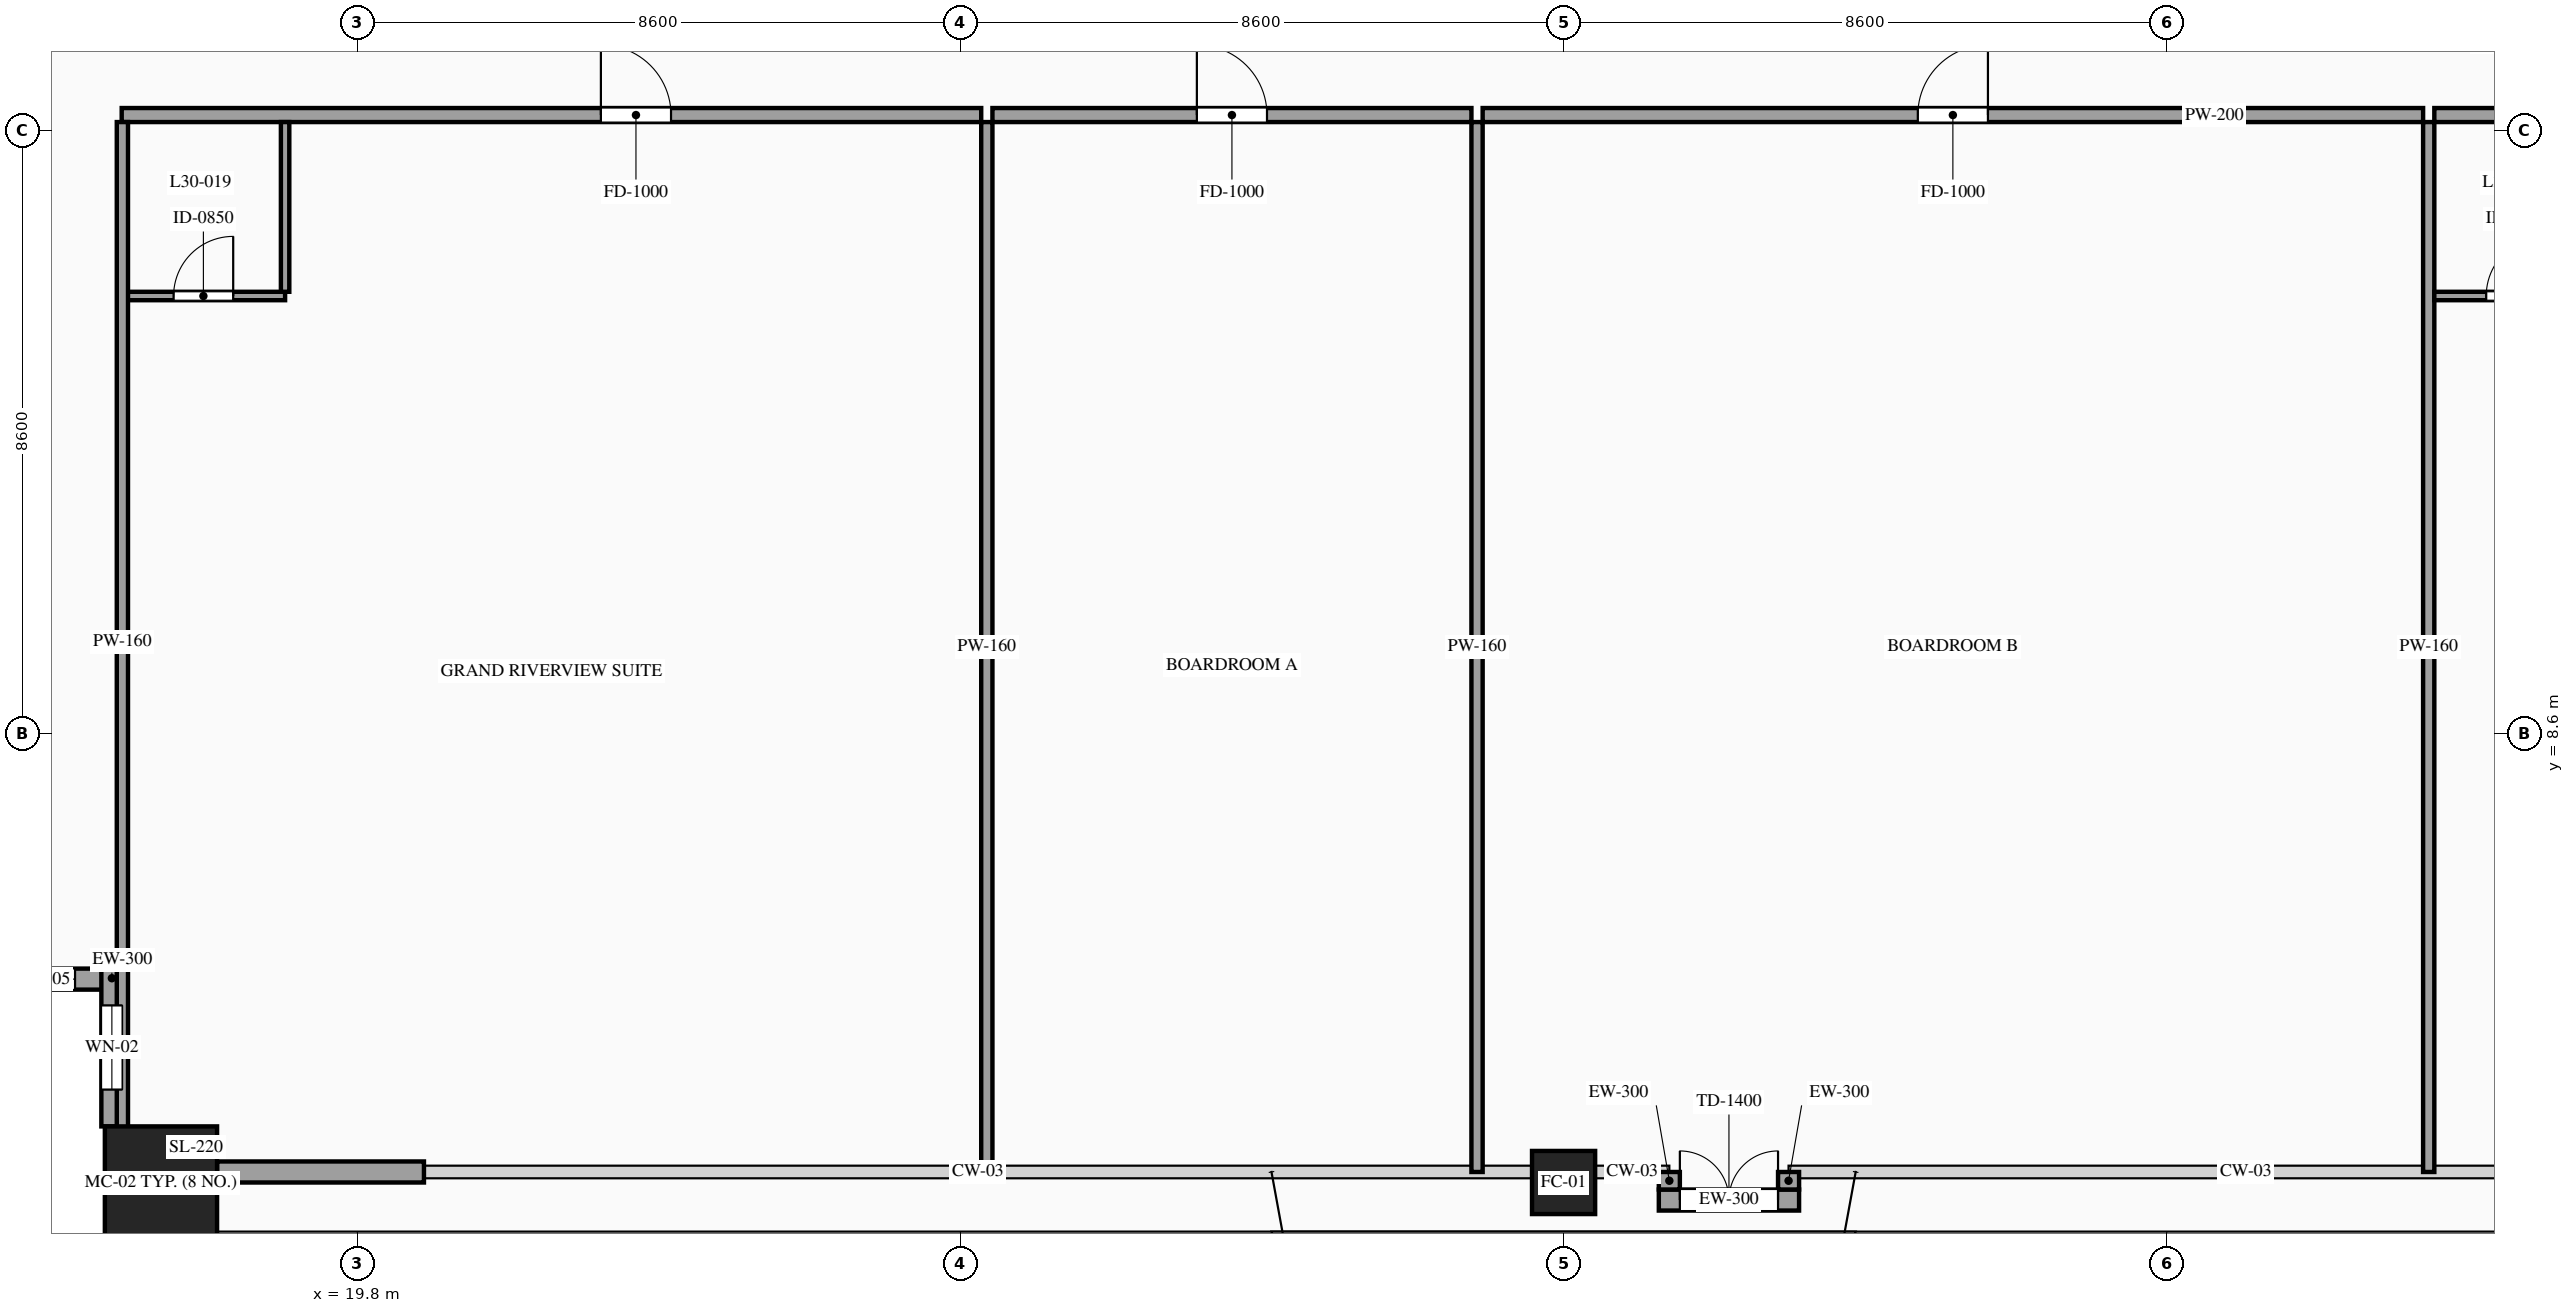
"""IFC4 building model, lengths in metres.
Left out: names, types, materials, properties, quantities, classifications, styles, units other than length and angle.
Written with IfcOpenShell. Run it as: python <this file> out.ifc"""

import sys

from ifc_helpers import new_model, si_unit, direction, frame, frame_2d, origin, origin_2d, place, context, subcontext, project, spatial, rectangle, hollow_rectangle, extrude, source, transform, mapped, element, fill, save


model = new_model("IFC4")
c1 = context("Model", 3, precision=1e-05, world=origin(), true_north=direction((0.0, 1.0)))
c2 = subcontext(c1, "Body", "Model", "MODEL_VIEW")
j1 = project(units=[si_unit("LENGTHUNIT", "METRE"), si_unit("PLANEANGLEUNIT", "RADIAN")], contexts=[c1])
p1 = place(None, origin())
s1 = spatial("IfcSite", under=j1, at=p1, CompositionType="ELEMENT")
p2 = place(p1, origin())
s2 = spatial("IfcBuilding", under=s1, at=p2, CompositionType="ELEMENT")
p3 = place(p2, frame((0.0, 0.0, 115.4)))
s3 = spatial("IfcBuildingStorey", under=s2, at=p3, CompositionType="ELEMENT", Elevation=115.4)
m1 = source(origin(), c2, "Body", "SweptSolid", [
    extrude(hollow_rectangle(XDim=1.6, YDim=1.6, WallThickness=0.07, at=origin_2d()), origin(), (0.0, 0.0, 1.0), 3.6),
])
p4 = place(p3, frame((17.0, 2.2, 0.0), z_axis=(0.0, 0.0, 1.0), x_axis=(1.0, 0.0, 0.0)))
e1 = element("IfcColumn", 1, at=p4, inside=s3, PredefinedType="COLUMN", context=c2, shape_type="MappedRepresentation", body=[
    mapped(m1, transform((0.0, 0.0, 0.0), scale=1.0)),
])
m2 = source(origin(), c2, "Body", "SweptSolid", [
    extrude(hollow_rectangle(XDim=0.9, YDim=0.9, WallThickness=0.042, at=origin_2d()), origin(), (0.0, 0.0, 1.0), 3.6),
])
p5 = place(p3, frame((37.0, 2.2, 0.0), z_axis=(0.0, 0.0, 1.0), x_axis=(1.0, 0.0, 0.0)))
e2 = element("IfcColumn", 2, at=p5, inside=s3, PredefinedType="COLUMN", context=c2, shape_type="MappedRepresentation", body=[
    mapped(m2, transform((0.0, 0.0, 0.0), scale=1.0)),
])
p6 = place(p3, frame((14.2, 5.1, 0.0), z_axis=(0.0, 0.0, 1.0), x_axis=(1.0, 0.0, 0.0)))
e3 = element("IfcWall", 3, at=p6, inside=s3, PredefinedType="SOLIDWALL", context=c2, shape_type="SweptSolid", body=[
    extrude(rectangle(XDim=2.25, YDim=0.3, at=frame_2d((1.125, 0.0))), origin(), (0.0, 0.0, 1.0), 3.38),
])
p7 = place(p6, frame((0.675, 0.0, 0.85)))
e4 = element("IfcOpeningElement", 4, at=p7, cuts=e3, PredefinedType="OPENING", context=c2, shape_type="SweptSolid", body=[
    extrude(rectangle(XDim=0.9, YDim=1.5, at=frame_2d((0.45, 0.75))), frame((0.0, 0.165, 0.0), z_axis=(0.0, -1.0, 0.0), x_axis=(1.0, 0.0, 0.0)), (0.0, 0.0, 1.0), 0.33),
])
p8 = place(p3, frame((16.3, 5.25, 0.0), z_axis=(0.0, 0.0, 1.0), x_axis=(0.0, -1.0, 0.0)))
e5 = element("IfcWall", 5, at=p8, inside=s3, PredefinedType="SOLIDWALL", context=c2, shape_type="SweptSolid", body=[
    extrude(rectangle(XDim=2.25, YDim=0.3, at=frame_2d((1.125, 0.0))), origin(), (0.0, 0.0, 1.0), 3.38),
])
p9 = place(p8, frame((0.525, 0.0, 0.85)))
e6 = element("IfcOpeningElement", 6, at=p9, cuts=e5, PredefinedType="OPENING", context=c2, shape_type="SweptSolid", body=[
    extrude(rectangle(XDim=1.2, YDim=2.1, at=frame_2d((0.6, 1.05))), frame((0.0, 0.165, 0.0), z_axis=(0.0, -1.0, 0.0), x_axis=(1.0, 0.0, 0.0)), (0.0, 0.0, 1.0), 0.33),
])
m3 = source(origin(), c2, "Body", "SweptSolid", [
    extrude(rectangle(XDim=2.95, YDim=0.3, at=frame_2d((1.475, 0.0))), origin(), (0.0, 0.0, 1.0), 2.775),
])
p10 = place(p3, frame((17.8, 2.35, 0.0), z_axis=(0.0, 0.0, 1.0), x_axis=(1.0, 0.0, 0.0)))
e7 = element("IfcWall", 7, at=p10, inside=s3, PredefinedType="SOLIDWALL", context=c2, shape_type="MappedRepresentation", body=[
    mapped(m3, transform((0.0, 0.0, 0.0), scale=1.0)),
])
p11 = place(p3, frame((38.358, 1.95, 0.0), z_axis=(0.0, 0.0, 1.0), x_axis=(1.0, 0.0, 0.0)))
e8 = element("IfcWall", 8, at=p11, inside=s3, PredefinedType="SOLIDWALL", context=c2, shape_type="SweptSolid", body=[
    extrude(rectangle(XDim=2.0, YDim=0.3, at=frame_2d((1.0, 0.0))), origin(), (0.0, 0.0, 1.0), 3.38),
])
p12 = place(p11, frame((0.3, 0.0, 0.0)))
e9 = element("IfcOpeningElement", 9, at=p12, cuts=e8, PredefinedType="OPENING", context=c2, shape_type="SweptSolid", body=[
    extrude(rectangle(XDim=1.4, YDim=2.3, at=frame_2d((0.7, 1.15))), frame((0.0, 0.165, 0.0), z_axis=(0.0, -1.0, 0.0), x_axis=(1.0, 0.0, 0.0)), (0.0, 0.0, 1.0), 0.33),
])
m4 = source(origin(), c2, "Body", "SweptSolid", [
    extrude(rectangle(XDim=0.25, YDim=0.3, at=frame_2d((0.125, 0.0))), origin(), (0.0, 0.0, 1.0), 3.38),
])
for number, where, z_axis, x_axis in (
    (10, (38.508, 2.35, 0.0), (0.0, 0.0, 1.0), (0.0, -1.0, 0.0)),
    (11, (40.208, 2.1, 0.0), (0.0, 0.0, 1.0), (0.0, 1.0, 0.0)),
):
    element("IfcWall", number, at=place(p3, frame(where, z_axis=z_axis, x_axis=x_axis)), inside=s3, PredefinedType="SOLIDWALL", context=c2, shape_type="MappedRepresentation", body=[
        mapped(m4, transform((0.0, 0.0, 0.0), scale=1.0)),
    ])
p13 = place(p3, frame((16.44, 17.42, 0.0), z_axis=(0.0, 0.0, 1.0), x_axis=(1.0, 0.0, 0.0)))
e12 = element("IfcWall", 12, at=p13, inside=s3, PredefinedType="PARTITIONING", context=c2, shape_type="SweptSolid", body=[
    extrude(rectangle(XDim=12.256, YDim=0.2, at=frame_2d((6.128, 0.0))), origin(), (0.0, 0.0, 1.0), 3.38),
])
p14 = place(p13, frame((6.833, 0.0, 0.0)))
e13 = element("IfcOpeningElement", 13, at=p14, cuts=e12, PredefinedType="OPENING", context=c2, shape_type="SweptSolid", body=[
    extrude(rectangle(XDim=1.0, YDim=2.2, at=frame_2d((0.5, 1.1))), frame((0.0, 0.115, 0.0), z_axis=(0.0, -1.0, 0.0), x_axis=(1.0, 0.0, 0.0)), (0.0, 0.0, 1.0), 0.23),
])
m5 = source(origin(), c2, "Body", "SweptSolid", [
    extrude(rectangle(XDim=14.97, YDim=0.16, at=frame_2d((7.485, 0.0))), origin(), (0.0, 0.0, 1.0), 3.38),
])
p15 = place(p3, frame((28.776, 2.35, 0.0), z_axis=(0.0, 0.0, 1.0), x_axis=(0.0, 1.0, 0.0)))
e14 = element("IfcWall", 14, at=p15, inside=s3, PredefinedType="PARTITIONING", context=c2, shape_type="MappedRepresentation", body=[
    mapped(m5, transform((0.0, 0.0, 0.0), scale=1.0)),
])
p16 = place(p3, frame((16.44, 14.84, 0.0), z_axis=(0.0, 0.0, 1.0), x_axis=(1.0, 0.0, 0.0)))
e15 = element("IfcWall", 15, at=p16, inside=s3, PredefinedType="PARTITIONING", context=c2, shape_type="SweptSolid", body=[
    extrude(rectangle(XDim=2.33, YDim=0.12, at=frame_2d((1.165, 0.0))), origin(), (0.0, 0.0, 1.0), 3.38),
])
p17 = place(p16, frame((0.74, 0.0, 0.0)))
e16 = element("IfcOpeningElement", 16, at=p17, cuts=e15, PredefinedType="OPENING", context=c2, shape_type="SweptSolid", body=[
    extrude(rectangle(XDim=0.85, YDim=2.1, at=frame_2d((0.425, 1.05))), frame((0.0, 0.075, 0.0), z_axis=(0.0, -1.0, 0.0), x_axis=(1.0, 0.0, 0.0)), (0.0, 0.0, 1.0), 0.15),
])
m6 = source(origin(), c2, "Body", "SweptSolid", [
    extrude(rectangle(XDim=2.42, YDim=0.12, at=frame_2d((1.21, 0.0))), origin(), (0.0, 0.0, 1.0), 3.38),
])
p18 = place(p3, frame((18.77, 14.9, 0.0), z_axis=(0.0, 0.0, 1.0), x_axis=(0.0, 1.0, 0.0)))
e17 = element("IfcWall", 17, at=p18, inside=s3, PredefinedType="PARTITIONING", context=c2, shape_type="MappedRepresentation", body=[
    mapped(m6, transform((0.0, 0.0, 0.0), scale=1.0)),
])
p19 = place(p3, frame((28.856, 17.42, 0.0), z_axis=(0.0, 0.0, 1.0), x_axis=(1.0, 0.0, 0.0)))
e18 = element("IfcWall", 18, at=p19, inside=s3, PredefinedType="PARTITIONING", context=c2, shape_type="SweptSolid", body=[
    extrude(rectangle(XDim=6.83, YDim=0.2, at=frame_2d((3.415, 0.0))), origin(), (0.0, 0.0, 1.0), 3.38),
])
p20 = place(p19, frame((2.915, 0.0, 0.0)))
e19 = element("IfcOpeningElement", 19, at=p20, cuts=e18, PredefinedType="OPENING", context=c2, shape_type="SweptSolid", body=[
    extrude(rectangle(XDim=1.0, YDim=2.2, at=frame_2d((0.5, 1.1))), frame((0.0, 0.115, 0.0), z_axis=(0.0, -1.0, 0.0), x_axis=(1.0, 0.0, 0.0)), (0.0, 0.0, 1.0), 0.23),
])
p21 = place(p3, frame((35.766, 2.35, 0.0), z_axis=(0.0, 0.0, 1.0), x_axis=(0.0, 1.0, 0.0)))
e20 = element("IfcWall", 20, at=p21, inside=s3, PredefinedType="PARTITIONING", context=c2, shape_type="MappedRepresentation", body=[
    mapped(m5, transform((0.0, 0.0, 0.0), scale=1.0)),
])
p22 = place(p3, frame((35.846, 17.42, 0.0), z_axis=(0.0, 0.0, 1.0), x_axis=(1.0, 0.0, 0.0)))
e21 = element("IfcWall", 21, at=p22, inside=s3, PredefinedType="PARTITIONING", context=c2, shape_type="SweptSolid", body=[
    extrude(rectangle(XDim=13.41, YDim=0.2, at=frame_2d((6.705, 0.0))), origin(), (0.0, 0.0, 1.0), 3.38),
])
p23 = place(p22, frame((6.205, 0.0, 0.0)))
e22 = element("IfcOpeningElement", 22, at=p23, cuts=e21, PredefinedType="OPENING", context=c2, shape_type="SweptSolid", body=[
    extrude(rectangle(XDim=1.0, YDim=2.2, at=frame_2d((0.5, 1.1))), frame((0.0, 0.115, 0.0), z_axis=(0.0, -1.0, 0.0), x_axis=(1.0, 0.0, 0.0)), (0.0, 0.0, 1.0), 0.23),
])
p24 = place(p3, frame((49.336, 2.35, 0.0), z_axis=(0.0, 0.0, 1.0), x_axis=(0.0, 1.0, 0.0)))
e23 = element("IfcWall", 23, at=p24, inside=s3, PredefinedType="PARTITIONING", context=c2, shape_type="MappedRepresentation", body=[
    mapped(m5, transform((0.0, 0.0, 0.0), scale=1.0)),
])
p25 = place(p3, frame((49.416, 17.42, 0.0), z_axis=(0.0, 0.0, 1.0), x_axis=(1.0, 0.0, 0.0)))
e24 = element("IfcWall", 24, at=p25, inside=s3, PredefinedType="PARTITIONING", context=c2, shape_type="SweptSolid", body=[
    extrude(rectangle(XDim=8.144, YDim=0.2, at=frame_2d((4.072, 0.0))), origin(), (0.0, 0.0, 1.0), 3.38),
])
p26 = place(p25, frame((4.777, 0.0, 0.0)))
e25 = element("IfcOpeningElement", 25, at=p26, cuts=e24, PredefinedType="OPENING", context=c2, shape_type="SweptSolid", body=[
    extrude(rectangle(XDim=1.0, YDim=2.2, at=frame_2d((0.5, 1.1))), frame((0.0, 0.115, 0.0), z_axis=(0.0, -1.0, 0.0), x_axis=(1.0, 0.0, 0.0)), (0.0, 0.0, 1.0), 0.23),
])
m7 = source(origin(), c2, "Body", "SweptSolid", [
    extrude(rectangle(XDim=14.82, YDim=0.16, at=frame_2d((7.41, 0.0))), origin(), (0.0, 0.0, 1.0), 3.38),
])
p27 = place(p3, frame((16.45, 2.5, 0.0), z_axis=(0.0, 0.0, 1.0), x_axis=(0.0, 1.0, 0.0)))
e26 = element("IfcWall", 26, at=p27, inside=s3, PredefinedType="PARTITIONING", context=c2, shape_type="MappedRepresentation", body=[
    mapped(m7, transform((0.0, 0.0, 0.0), scale=1.0)),
])
p28 = place(p3, frame((49.416, 14.84, 0.0), z_axis=(0.0, 0.0, 1.0), x_axis=(1.0, 0.0, 0.0)))
e27 = element("IfcWall", 27, at=p28, inside=s3, PredefinedType="PARTITIONING", context=c2, shape_type="SweptSolid", body=[
    extrude(rectangle(XDim=2.33, YDim=0.12, at=frame_2d((1.165, 0.0))), origin(), (0.0, 0.0, 1.0), 3.38),
])
p29 = place(p28, frame((0.74, 0.0, 0.0)))
e28 = element("IfcOpeningElement", 28, at=p29, cuts=e27, PredefinedType="OPENING", context=c2, shape_type="SweptSolid", body=[
    extrude(rectangle(XDim=0.85, YDim=2.1, at=frame_2d((0.425, 1.05))), frame((0.0, 0.075, 0.0), z_axis=(0.0, -1.0, 0.0), x_axis=(1.0, 0.0, 0.0)), (0.0, 0.0, 1.0), 0.15),
])
m8 = source(origin(), c2, "Body", "SweptSolid", [
    extrude(rectangle(XDim=0.9, YDim=1.5, at=frame_2d((0.45, 0.75))), frame((0.0, 0.03, 0.0), z_axis=(0.0, -1.0, 0.0), x_axis=(1.0, 0.0, 0.0)), (0.0, 0.0, 1.0), 0.06),
])
p30 = place(p7, origin())
e29 = element("IfcWindow", 29, at=p30, inside=s3, PartitioningType="SINGLE_PANEL", PredefinedType="WINDOW", context=c2, shape_type="MappedRepresentation", body=[
    mapped(m8, transform((0.0, 0.0, 0.0), scale=1.0)),
])
fill(e4, e29)
m9 = source(origin(), c2, "Body", "SweptSolid", [
    extrude(rectangle(XDim=1.2, YDim=2.1, at=frame_2d((0.6, 1.05))), frame((0.0, 0.03, 0.0), z_axis=(0.0, -1.0, 0.0), x_axis=(1.0, 0.0, 0.0)), (0.0, 0.0, 1.0), 0.06),
])
p31 = place(p9, origin())
e30 = element("IfcWindow", 30, at=p31, inside=s3, PartitioningType="SINGLE_PANEL", PredefinedType="WINDOW", context=c2, shape_type="MappedRepresentation", body=[
    mapped(m9, transform((0.0, 0.0, 0.0), scale=1.0)),
])
fill(e6, e30)
m10 = source(origin(), c2, "Body", "SweptSolid", [
    extrude(rectangle(XDim=1.4, YDim=2.3, at=frame_2d((0.7, 1.15))), frame((0.0, 0.025, 0.0), z_axis=(0.0, -1.0, 0.0), x_axis=(1.0, 0.0, 0.0)), (0.0, 0.0, 1.0), 0.05),
])
p32 = place(p12, origin())
e31 = element("IfcDoor", 31, at=p32, inside=s3, OperationType="DOUBLE_DOOR_SINGLE_SWING", PredefinedType="DOOR", context=c2, shape_type="MappedRepresentation", body=[
    mapped(m10, transform((0.0, 0.0, 0.0), scale=1.0)),
])
fill(e9, e31)
m11 = source(origin(), c2, "Body", "SweptSolid", [
    extrude(rectangle(XDim=1.0, YDim=2.2, at=frame_2d((0.5, 1.1))), frame((0.0, 0.025, 0.0), z_axis=(0.0, -1.0, 0.0), x_axis=(1.0, 0.0, 0.0)), (0.0, 0.0, 1.0), 0.05),
])
p33 = place(p14, origin())
e32 = element("IfcDoor", 32, at=p33, inside=s3, OperationType="SINGLE_SWING_LEFT", PredefinedType="DOOR", context=c2, shape_type="MappedRepresentation", body=[
    mapped(m11, transform((0.0, 0.0, 0.0), scale=1.0)),
])
fill(e13, e32)
m12 = source(origin(), c2, "Body", "SweptSolid", [
    extrude(rectangle(XDim=0.85, YDim=2.1, at=frame_2d((0.425, 1.05))), frame((0.0, 0.025, 0.0), z_axis=(0.0, -1.0, 0.0), x_axis=(1.0, 0.0, 0.0)), (0.0, 0.0, 1.0), 0.05),
])
p34 = place(p17, origin())
e33 = element("IfcDoor", 33, at=p34, inside=s3, OperationType="SINGLE_SWING_RIGHT", PredefinedType="DOOR", context=c2, shape_type="MappedRepresentation", body=[
    mapped(m12, transform((0.0, 0.0, 0.0), scale=1.0)),
])
fill(e16, e33)
p35 = place(p20, origin())
e34 = element("IfcDoor", 34, at=p35, inside=s3, OperationType="SINGLE_SWING_LEFT", PredefinedType="DOOR", context=c2, shape_type="MappedRepresentation", body=[
    mapped(m11, transform((0.0, 0.0, 0.0), scale=1.0)),
])
fill(e19, e34)
p36 = place(p23, origin())
e35 = element("IfcDoor", 35, at=p36, inside=s3, OperationType="SINGLE_SWING_RIGHT", PredefinedType="DOOR", context=c2, shape_type="MappedRepresentation", body=[
    mapped(m11, transform((0.0, 0.0, 0.0), scale=1.0)),
])
fill(e22, e35)
p37 = place(p29, origin())
e36 = element("IfcDoor", 36, at=p37, inside=s3, OperationType="SINGLE_SWING_RIGHT", PredefinedType="DOOR", context=c2, shape_type="MappedRepresentation", body=[
    mapped(m12, transform((0.0, 0.0, 0.0), scale=1.0)),
])
fill(e28, e36)
save(model, sys.argv[1])
